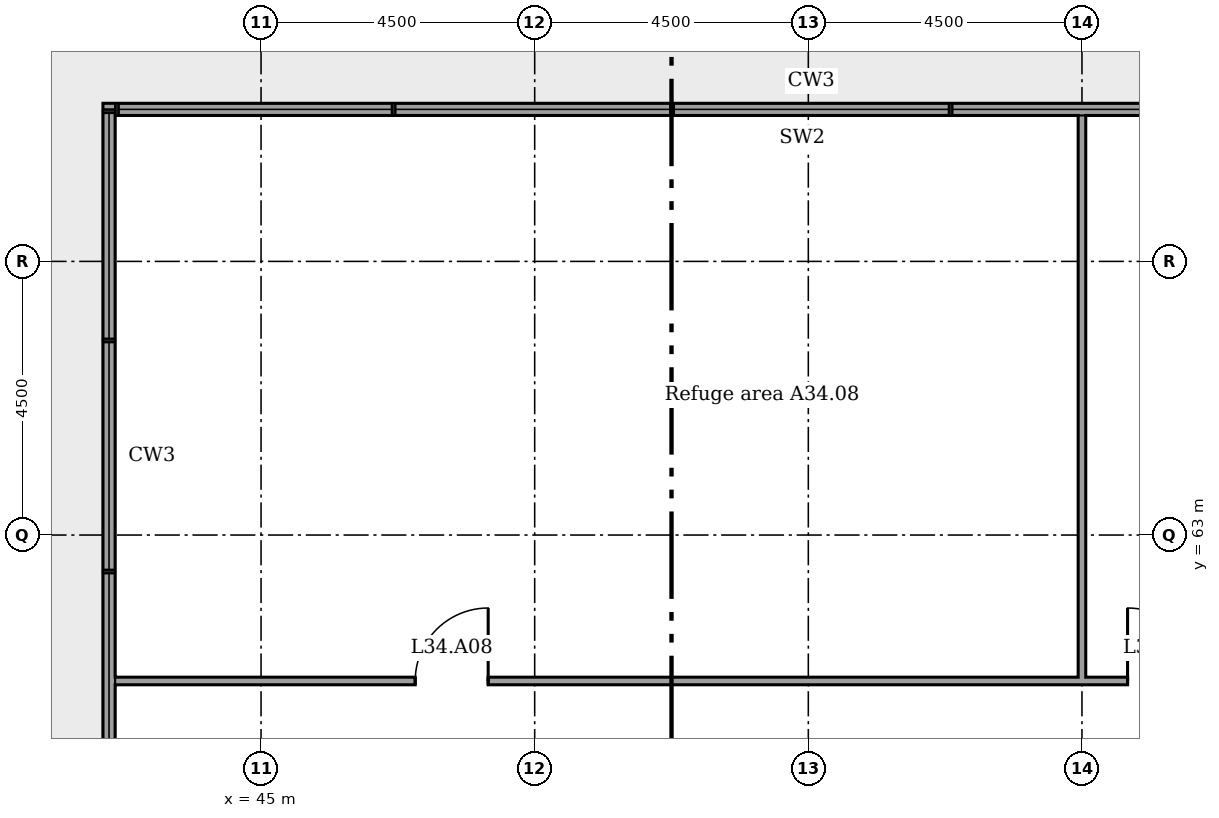
"""IFC4 building model, lengths in metres.
Left out: names, types, materials, properties, quantities, classifications, styles, units other than length and angle.
Written with IfcOpenShell. Run it as: python <this file> out.ifc"""

import sys

from ifc_helpers import new_model, si_unit, direction, frame, frame_2d, origin, place, context, subcontext, project, spatial, rectangle, extrude, element, fill, save


model = new_model("IFC4")
c1 = context("Model", 3, precision=1e-05, world=origin(), true_north=direction((0.0, 1.0)))
c2 = subcontext(c1, "Body", "Model", "MODEL_VIEW")
j1 = project(units=[si_unit("LENGTHUNIT", "METRE"), si_unit("PLANEANGLEUNIT", "RADIAN")], contexts=[c1])
p1 = place(None, origin())
s1 = spatial("IfcSite", under=j1, at=p1, CompositionType="ELEMENT")
p2 = place(p1, origin())
s2 = spatial("IfcBuilding", under=s1, at=p2, CompositionType="ELEMENT")
p3 = place(p2, frame((0.0, 0.0, 138.8)))
s3 = spatial("IfcBuildingStorey", under=s2, at=p3, CompositionType="ELEMENT", Elevation=138.8)
p4 = place(p3, frame((65.4, 70.0, 0.0), z_axis=(0.0, 0.0, 1.0), x_axis=(-1.0, 0.0, 0.0)))
e1 = element("IfcWall", 1, at=p4, inside=s3, PredefinedType="ELEMENTEDWALL", context=c2, shape_type="SweptSolid", body=[
    extrude(rectangle(XDim=23.0, YDim=0.2, at=frame_2d((11.5, 0.0))), origin(), (0.0, 0.0, 1.0), 1.8),
])
p5 = place(p3, frame((42.5, 69.9, 0.0), z_axis=(0.0, 0.0, 1.0), x_axis=(0.0, -1.0, 0.0)))
e2 = element("IfcWall", 2, at=p5, inside=s3, PredefinedType="ELEMENTEDWALL", context=c2, shape_type="SweptSolid", body=[
    extrude(rectangle(XDim=11.4, YDim=0.2, at=frame_2d((5.7, 0.0))), origin(), (0.0, 0.0, 1.0), 1.8),
])
p6 = place(p3, frame((42.6, 60.6, 0.0)))
e3 = element("IfcWall", 3, at=p6, inside=s3, PredefinedType="PARTITIONING", context=c2, shape_type="SweptSolid", body=[
    extrude(rectangle(XDim=18.662, YDim=0.125, at=frame_2d((9.331, 0.0))), origin(), (0.0, 0.0, 1.0), 4.85),
])
p7 = place(p6, frame((16.65, 0.0, 0.0)))
e4 = element("IfcOpeningElement", 4, at=p7, cuts=e3, PredefinedType="OPENING", context=c2, shape_type="SweptSolid", body=[
    extrude(rectangle(XDim=1.2, YDim=2.1, at=frame_2d((0.6, 1.05))), frame((0.0, 0.073, 0.0), z_axis=(0.0, -1.0, 0.0), x_axis=(1.0, 0.0, 0.0)), (0.0, 0.0, 1.0), 0.145),
])
p8 = place(p6, frame((4.935, 0.0, 0.0)))
e5 = element("IfcOpeningElement", 5, at=p8, cuts=e3, PredefinedType="OPENING", context=c2, shape_type="SweptSolid", body=[
    extrude(rectangle(XDim=1.2, YDim=2.1, at=frame_2d((0.6, 1.05))), frame((0.0, 0.073, 0.0), z_axis=(0.0, -1.0, 0.0), x_axis=(1.0, 0.0, 0.0)), (0.0, 0.0, 1.0), 0.145),
])
p9 = place(p3, frame((58.5, 60.6, 0.0), z_axis=(0.0, 0.0, 1.0), x_axis=(0.0, 1.0, 0.0)))
e6 = element("IfcWall", 6, at=p9, inside=s3, PredefinedType="PARTITIONING", context=c2, shape_type="SweptSolid", body=[
    extrude(rectangle(XDim=9.3, YDim=0.125, at=frame_2d((4.65, 0.0))), origin(), (0.0, 0.0, 1.0), 4.166),
])
p10 = place(p7, origin())
e7 = element("IfcDoor", 7, at=p10, inside=s3, OperationType="SINGLE_SWING_RIGHT", PredefinedType="DOOR", context=c2, shape_type="SweptSolid", body=[
    extrude(rectangle(XDim=1.2, YDim=2.1, at=frame_2d((0.6, 1.05))), frame((0.0, 0.025, 0.0), z_axis=(0.0, -1.0, 0.0), x_axis=(1.0, 0.0, 0.0)), (0.0, 0.0, 1.0), 0.05),
])
fill(e4, e7)
p11 = place(p8, origin())
e8 = element("IfcDoor", 8, at=p11, inside=s3, OperationType="SINGLE_SWING_LEFT", PredefinedType="DOOR", context=c2, shape_type="SweptSolid", body=[
    extrude(rectangle(XDim=1.2, YDim=2.1, at=frame_2d((0.6, 1.05))), frame((0.0, 0.025, 0.0), z_axis=(0.0, -1.0, 0.0), x_axis=(1.0, 0.0, 0.0)), (0.0, 0.0, 1.0), 0.05),
])
fill(e5, e8)
save(model, sys.argv[1])
